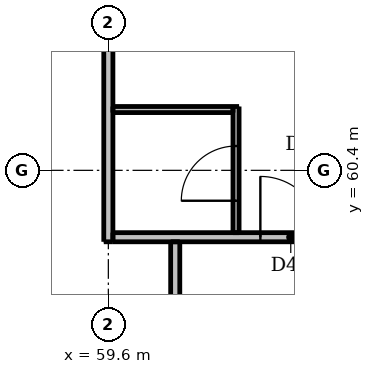
"""IFC4 building model, lengths in metres.
Left out: names, types, materials, properties, quantities, classifications, styles, units other than length and angle.
Written with IfcOpenShell. Run it as: python <this file> out.ifc"""

import sys

from ifc_helpers import new_model, si_unit, direction, frame, frame_2d, origin, place, context, subcontext, project, spatial, rectangle, extrude, element, fill, save


model = new_model("IFC4")
c1 = context("Model", 3, precision=1e-05, world=origin(), true_north=direction((0.0, 1.0)))
c2 = subcontext(c1, "Body", "Model", "MODEL_VIEW")
j1 = project(units=[si_unit("LENGTHUNIT", "METRE"), si_unit("PLANEANGLEUNIT", "RADIAN")], contexts=[c1])
p1 = place(None, origin())
s1 = spatial("IfcSite", under=j1, at=p1, CompositionType="ELEMENT")
p2 = place(p1, origin())
s2 = spatial("IfcBuilding", under=s1, at=p2, CompositionType="ELEMENT")
p3 = place(p2, frame((0.0, 0.0, 23.5)))
s3 = spatial("IfcBuildingStorey", under=s2, at=p3, CompositionType="ELEMENT", Elevation=23.5)
p4 = place(p3, frame((61.7, 59.375, 0.0), z_axis=(0.0, 0.0, 1.0), x_axis=(0.0, 1.0, 0.0)))
e1 = element("IfcWall", 1, at=p4, inside=s3, PredefinedType="PARTITIONING", context=c2, shape_type="SweptSolid", body=[
    extrude(rectangle(XDim=2.075, YDim=0.1, at=frame_2d((1.038, 0.0))), origin(), (0.0, 0.0, 1.0), 3.05),
])
p5 = place(p4, frame((0.525, 0.0, 0.0)))
e2 = element("IfcOpeningElement", 2, at=p5, cuts=e1, PredefinedType="OPENING", context=c2, shape_type="SweptSolid", body=[
    extrude(rectangle(XDim=0.9, YDim=2.1, at=frame_2d((0.45, 1.05))), frame((0.0, 0.06, 0.0), z_axis=(0.0, -1.0, 0.0), x_axis=(1.0, 0.0, 0.0)), (0.0, 0.0, 1.0), 0.12),
])
p6 = place(p3, frame((59.675, 61.4, 0.0), z_axis=(0.0, 0.0, 1.0), x_axis=(1.0, 0.0, 0.0)))
e3 = element("IfcWall", 3, at=p6, inside=s3, PredefinedType="PARTITIONING", context=c2, shape_type="SweptSolid", body=[
    extrude(rectangle(XDim=1.975, YDim=0.1, at=frame_2d((0.987, 0.0))), origin(), (0.0, 0.0, 1.0), 3.05),
])
p7 = place(p3, frame((59.6, 59.225, 0.0), z_axis=(0.0, 0.0, 1.0), x_axis=(0.0, 1.0, 0.0)))
e4 = element("IfcWall", 4, at=p7, inside=s3, PredefinedType="PARTITIONING", context=c2, shape_type="SweptSolid", body=[
    extrude(rectangle(XDim=8.775, YDim=0.15, at=frame_2d((4.387, 0.0))), origin(), (0.0, 0.0, 1.0), 2.51),
])
p8 = place(p3, frame((60.7, 30.325, 0.0), z_axis=(0.0, 0.0, 1.0), x_axis=(0.0, 1.0, 0.0)))
e5 = element("IfcWall", 5, at=p8, inside=s3, PredefinedType="PARTITIONING", context=c2, shape_type="SweptSolid", body=[
    extrude(rectangle(XDim=28.9, YDim=0.15, at=frame_2d((14.45, 0.0))), origin(), (0.0, 0.0, 1.0), 3.05),
])
p9 = place(p8, frame((2.575, 0.0, 0.0)))
e6 = element("IfcOpeningElement", 6, at=p9, cuts=e5, PredefinedType="OPENING", context=c2, shape_type="SweptSolid", body=[
    extrude(rectangle(XDim=1.0, YDim=2.1, at=frame_2d((0.5, 1.05))), frame((0.0, 0.085, 0.0), z_axis=(0.0, -1.0, 0.0), x_axis=(1.0, 0.0, 0.0)), (0.0, 0.0, 1.0), 0.17),
])
p10 = place(p8, frame((8.575, 0.0, 0.0)))
e7 = element("IfcOpeningElement", 7, at=p10, cuts=e5, PredefinedType="OPENING", context=c2, shape_type="SweptSolid", body=[
    extrude(rectangle(XDim=1.0, YDim=2.1, at=frame_2d((0.5, 1.05))), frame((0.0, 0.085, 0.0), z_axis=(0.0, -1.0, 0.0), x_axis=(1.0, 0.0, 0.0)), (0.0, 0.0, 1.0), 0.17),
])
p11 = place(p8, frame((14.575, 0.0, 0.0)))
e8 = element("IfcOpeningElement", 8, at=p11, cuts=e5, PredefinedType="OPENING", context=c2, shape_type="SweptSolid", body=[
    extrude(rectangle(XDim=1.0, YDim=2.1, at=frame_2d((0.5, 1.05))), frame((0.0, 0.085, 0.0), z_axis=(0.0, -1.0, 0.0), x_axis=(1.0, 0.0, 0.0)), (0.0, 0.0, 1.0), 0.17),
])
p12 = place(p8, frame((26.025, 0.0, 0.0)))
e9 = element("IfcOpeningElement", 9, at=p12, cuts=e5, PredefinedType="OPENING", context=c2, shape_type="SweptSolid", body=[
    extrude(rectangle(XDim=1.0, YDim=2.1, at=frame_2d((0.5, 1.05))), frame((0.0, 0.085, 0.0), z_axis=(0.0, -1.0, 0.0), x_axis=(1.0, 0.0, 0.0)), (0.0, 0.0, 1.0), 0.17),
])
p13 = place(p3, frame((59.675, 59.3, 0.0), z_axis=(0.0, 0.0, 1.0), x_axis=(1.0, 0.0, 0.0)))
e10 = element("IfcWall", 10, at=p13, inside=s3, PredefinedType="PARTITIONING", context=c2, shape_type="SweptSolid", body=[
    extrude(rectangle(XDim=28.55, YDim=0.15, at=frame_2d((14.275, 0.0))), origin(), (0.0, 0.0, 1.0), 3.05),
])
p14 = place(p13, frame((2.425, 0.0, 0.0)))
e11 = element("IfcOpeningElement", 11, at=p14, cuts=e10, PredefinedType="OPENING", context=c2, shape_type="SweptSolid", body=[
    extrude(rectangle(XDim=1.0, YDim=2.1, at=frame_2d((0.5, 1.05))), frame((0.0, 0.085, 0.0), z_axis=(0.0, -1.0, 0.0), x_axis=(1.0, 0.0, 0.0)), (0.0, 0.0, 1.0), 0.17),
])
p15 = place(p13, frame((8.425, 0.0, 0.0)))
e12 = element("IfcOpeningElement", 12, at=p15, cuts=e10, PredefinedType="OPENING", context=c2, shape_type="SweptSolid", body=[
    extrude(rectangle(XDim=1.0, YDim=2.1, at=frame_2d((0.5, 1.05))), frame((0.0, 0.085, 0.0), z_axis=(0.0, -1.0, 0.0), x_axis=(1.0, 0.0, 0.0)), (0.0, 0.0, 1.0), 0.17),
])
p16 = place(p13, frame((14.425, 0.0, 0.0)))
e13 = element("IfcOpeningElement", 13, at=p16, cuts=e10, PredefinedType="OPENING", context=c2, shape_type="SweptSolid", body=[
    extrude(rectangle(XDim=1.0, YDim=2.1, at=frame_2d((0.5, 1.05))), frame((0.0, 0.085, 0.0), z_axis=(0.0, -1.0, 0.0), x_axis=(1.0, 0.0, 0.0)), (0.0, 0.0, 1.0), 0.17),
])
p17 = place(p13, frame((25.775, 0.0, 0.0)))
e14 = element("IfcOpeningElement", 14, at=p17, cuts=e10, PredefinedType="OPENING", context=c2, shape_type="SweptSolid", body=[
    extrude(rectangle(XDim=1.0, YDim=2.1, at=frame_2d((0.5, 1.05))), frame((0.0, 0.085, 0.0), z_axis=(0.0, -1.0, 0.0), x_axis=(1.0, 0.0, 0.0)), (0.0, 0.0, 1.0), 0.17),
])
p18 = place(p14, origin())
e15 = element("IfcDoor", 15, at=p18, inside=s3, OperationType="SINGLE_SWING_LEFT", PredefinedType="DOOR", context=c2, shape_type="SweptSolid", body=[
    extrude(rectangle(XDim=1.0, YDim=2.1, at=frame_2d((0.5, 1.05))), frame((0.0, 0.025, 0.0), z_axis=(0.0, -1.0, 0.0), x_axis=(1.0, 0.0, 0.0)), (0.0, 0.0, 1.0), 0.05),
])
fill(e11, e15)
p19 = place(p5, origin())
e16 = element("IfcDoor", 16, at=p19, inside=s3, OperationType="SINGLE_SWING_LEFT", PredefinedType="DOOR", context=c2, shape_type="SweptSolid", body=[
    extrude(rectangle(XDim=0.9, YDim=2.1, at=frame_2d((0.45, 1.05))), frame((0.0, 0.025, 0.0), z_axis=(0.0, -1.0, 0.0), x_axis=(1.0, 0.0, 0.0)), (0.0, 0.0, 1.0), 0.05),
])
fill(e2, e16)
save(model, sys.argv[1])
